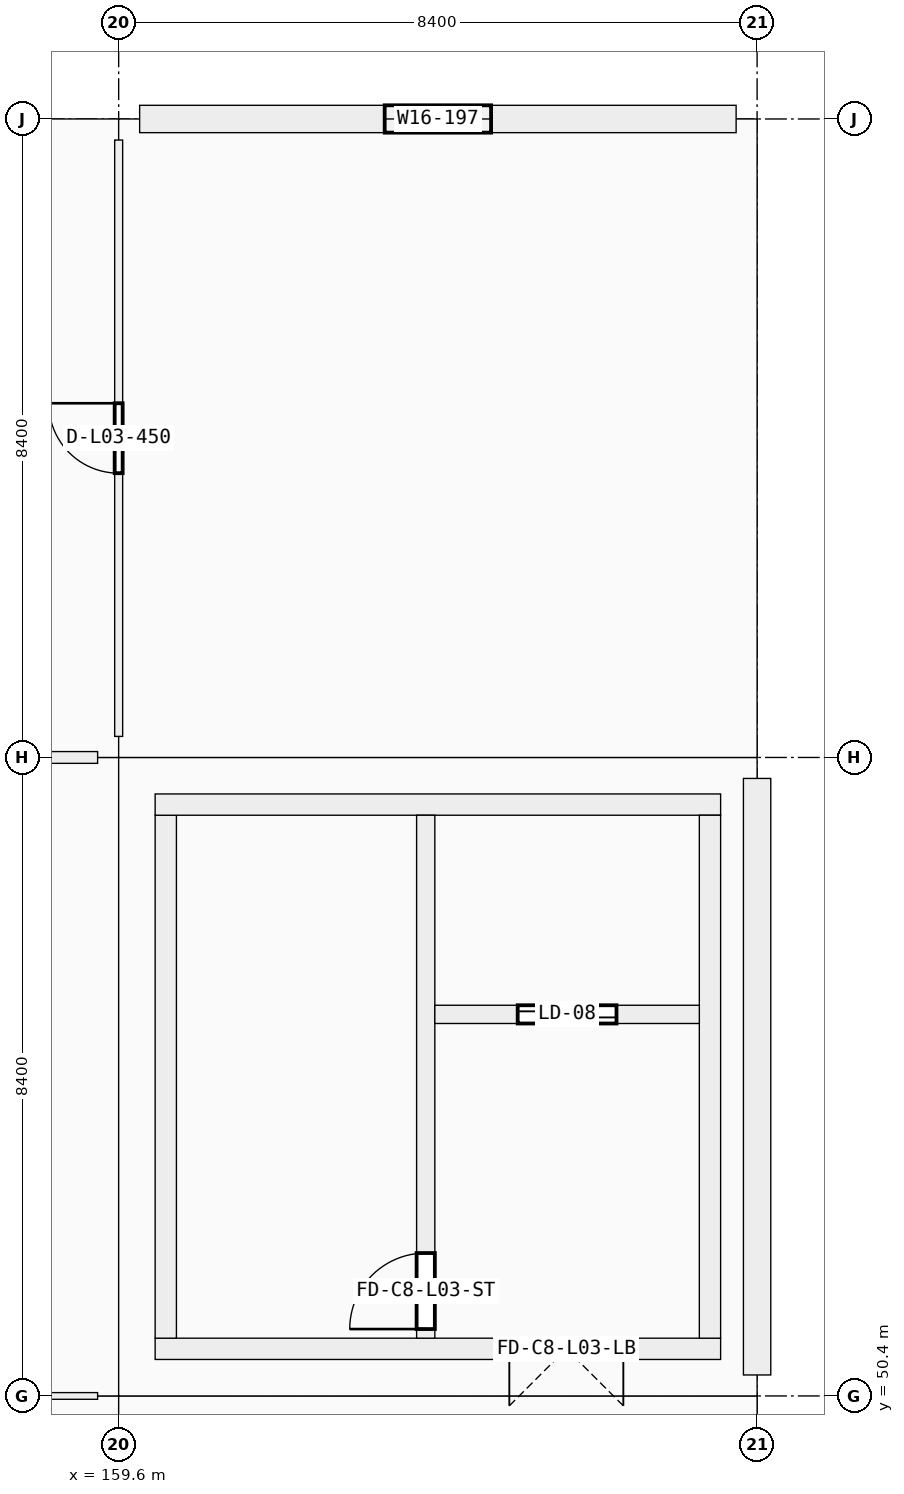
"""IFC4 building model, lengths in metres.
Left out: names, types, materials, properties, quantities, classifications, styles, units other than length and angle.
Written with IfcOpenShell. Run it as: python <this file> out.ifc"""

import sys

from ifc_helpers import new_model, si_unit, direction, frame, frame_2d, origin, origin_2d, place, context, subcontext, project, spatial, rectangle, i_section, extrude, element, fill, save


model = new_model("IFC4")
c1 = context("Model", 3, precision=1e-05, world=origin(), true_north=direction((0.0, 1.0)))
c2 = subcontext(c1, "Body", "Model", "MODEL_VIEW")
j1 = project(units=[si_unit("LENGTHUNIT", "METRE"), si_unit("PLANEANGLEUNIT", "RADIAN")], contexts=[c1])
p1 = place(None, origin())
s1 = spatial("IfcSite", under=j1, at=p1, CompositionType="ELEMENT")
p2 = place(p1, origin())
s2 = spatial("IfcBuilding", under=s1, at=p2, CompositionType="ELEMENT")
p3 = place(p2, frame((0.0, 0.0, 14.76)))
s3 = spatial("IfcBuildingStorey", under=s2, at=p3, CompositionType="ELEMENT", Elevation=14.76)
for number, where, z_axis, x_axis in (
    (1, (159.6, 50.4, 0.0), (0.0, 0.0, 1.0), (1.0, 0.0, 0.0)),
    (2, (159.6, 58.8, 0.0), (0.0, 0.0, 1.0), (1.0, 0.0, 0.0)),
    (3, (159.6, 67.2, 0.0), (0.0, 0.0, 1.0), (1.0, 0.0, 0.0)),
    (4, (168.0, 50.4, 0.0), (0.0, 0.0, 1.0), (1.0, 0.0, 0.0)),
    (5, (168.0, 58.8, 0.0), (0.0, 0.0, 1.0), (1.0, 0.0, 0.0)),
    (6, (168.0, 67.2, 0.0), (0.0, 0.0, 1.0), (1.0, 0.0, 0.0)),
):
    element("IfcColumn", number, at=place(p3, frame(where, z_axis=z_axis, x_axis=x_axis)), inside=s3, PredefinedType="COLUMN", context=c2, shape_type="SweptSolid", body=[
        extrude(rectangle(XDim=0.55, YDim=0.55, at=origin_2d()), origin(), (0.0, 0.0, 1.0), 4.17),
    ])
for number, where, z_axis, x_axis in (
    (7, (159.6, 50.4, 4.17), (0.0, 0.0, 1.0), (1.0, 0.0, 0.0)),
    (8, (167.86, 50.4, 4.17), (0.0, 0.0, 1.0), (1.0, 0.0, 0.0)),
    (9, (159.6, 58.8, 4.17), (0.0, 0.0, 1.0), (1.0, 0.0, 0.0)),
    (10, (167.86, 58.8, 4.17), (0.0, 0.0, 1.0), (1.0, 0.0, 0.0)),
):
    element("IfcColumn", number, at=place(p3, frame(where, z_axis=z_axis, x_axis=x_axis)), inside=s3, PredefinedType="COLUMN", context=c2, shape_type="SweptSolid", body=[
        extrude(i_section(OverallWidth=0.254, OverallDepth=0.254, WebThickness=0.009, FlangeThickness=0.014, FilletRadius=0.013, at=origin_2d()), origin(), (0.0, 0.0, 1.0), 2.157),
    ])
p4 = place(p3, frame((168.0, 58.524, 0.0), z_axis=(0.0, 0.0, 1.0), x_axis=(0.0, -1.0, 0.0)))
e11 = element("IfcWall", 11, at=p4, inside=s3, PredefinedType="SOLIDWALL", context=c2, shape_type="SweptSolid", body=[
    extrude(rectangle(XDim=7.848, YDim=0.36, at=frame_2d((3.924, 0.0))), origin(), (0.0, 0.0, 1.0), 3.37),
])
p5 = place(p3, frame((159.876, 67.2, 0.0), z_axis=(0.0, 0.0, 1.0), x_axis=(1.0, 0.0, 0.0)))
e12 = element("IfcWall", 12, at=p5, inside=s3, PredefinedType="SOLIDWALL", context=c2, shape_type="SweptSolid", body=[
    extrude(rectangle(XDim=7.848, YDim=0.36, at=frame_2d((3.924, 0.0))), origin(), (0.0, 0.0, 1.0), 3.37),
])
p6 = place(p5, frame((3.224, 0.0, 0.9)))
e13 = element("IfcOpeningElement", 13, at=p6, cuts=e12, PredefinedType="OPENING", context=c2, shape_type="SweptSolid", body=[
    extrude(rectangle(XDim=1.4, YDim=1.75, at=frame_2d((0.7, 0.875))), frame((0.0, 0.18, 0.0), z_axis=(0.0, -1.0, 0.0), x_axis=(1.0, 0.0, 0.0)), (0.0, 0.0, 1.0), 0.36),
])
p7 = place(p3, frame((167.52, 51.02, 0.0), z_axis=(0.0, 0.0, 1.0), x_axis=(-1.0, 0.0, 0.0)))
e14 = element("IfcWall", 14, at=p7, inside=s3, PredefinedType="SHEAR", context=c2, shape_type="SweptSolid", body=[
    extrude(rectangle(XDim=7.44, YDim=0.28, at=frame_2d((3.72, 0.0))), origin(), (0.0, 0.0, 1.0), 4.07),
])
p8 = place(p7, frame((1.28, 0.0, 0.0)))
e15 = element("IfcOpeningElement", 15, at=p8, cuts=e14, PredefinedType="OPENING", context=c2, shape_type="SweptSolid", body=[
    extrude(rectangle(XDim=1.5, YDim=2.15, at=frame_2d((0.75, 1.075))), frame((0.0, 0.14, 0.0), z_axis=(0.0, -1.0, 0.0), x_axis=(1.0, 0.0, 0.0)), (0.0, 0.0, 1.0), 0.28),
])
p9 = place(p3, frame((160.22, 51.16, 0.0), z_axis=(0.0, 0.0, 1.0), x_axis=(0.0, 1.0, 0.0)))
e16 = element("IfcWall", 16, at=p9, inside=s3, PredefinedType="SHEAR", context=c2, shape_type="SweptSolid", body=[
    extrude(rectangle(XDim=6.88, YDim=0.28, at=frame_2d((3.44, 0.0))), origin(), (0.0, 0.0, 1.0), 4.07),
])
p10 = place(p3, frame((160.08, 58.18, 0.0), z_axis=(0.0, 0.0, 1.0), x_axis=(1.0, 0.0, 0.0)))
e17 = element("IfcWall", 17, at=p10, inside=s3, PredefinedType="SHEAR", context=c2, shape_type="SweptSolid", body=[
    extrude(rectangle(XDim=7.44, YDim=0.28, at=frame_2d((3.72, 0.0))), origin(), (0.0, 0.0, 1.0), 4.07),
])
p11 = place(p3, frame((167.38, 58.04, 0.0), z_axis=(0.0, 0.0, 1.0), x_axis=(0.0, -1.0, 0.0)))
e18 = element("IfcWall", 18, at=p11, inside=s3, PredefinedType="SHEAR", context=c2, shape_type="SweptSolid", body=[
    extrude(rectangle(XDim=6.88, YDim=0.28, at=frame_2d((3.44, 0.0))), origin(), (0.0, 0.0, 1.0), 4.07),
])
p12 = place(p3, frame((163.64, 51.16, 0.0), z_axis=(0.0, 0.0, 1.0), x_axis=(0.0, 1.0, 0.0)))
e19 = element("IfcWall", 19, at=p12, inside=s3, PredefinedType="SHEAR", context=c2, shape_type="SweptSolid", body=[
    extrude(rectangle(XDim=6.88, YDim=0.24, at=frame_2d((3.44, 0.0))), origin(), (0.0, 0.0, 1.0), 4.07),
])
p13 = place(p12, frame((0.12, 0.0, 0.0)))
e20 = element("IfcOpeningElement", 20, at=p13, cuts=e19, PredefinedType="OPENING", context=c2, shape_type="SweptSolid", body=[
    extrude(rectangle(XDim=1.0, YDim=2.15, at=frame_2d((0.5, 1.075))), frame((0.0, 0.12, 0.0), z_axis=(0.0, -1.0, 0.0), x_axis=(1.0, 0.0, 0.0)), (0.0, 0.0, 1.0), 0.24),
])
p14 = place(p3, frame((163.76, 55.42, 0.0), z_axis=(0.0, 0.0, 1.0), x_axis=(1.0, 0.0, 0.0)))
e21 = element("IfcWall", 21, at=p14, inside=s3, PredefinedType="SHEAR", context=c2, shape_type="SweptSolid", body=[
    extrude(rectangle(XDim=3.48, YDim=0.24, at=frame_2d((1.74, 0.0))), origin(), (0.0, 0.0, 1.0), 4.07),
])
p15 = place(p14, frame((1.09, 0.0, 0.0)))
e22 = element("IfcOpeningElement", 22, at=p15, cuts=e21, PredefinedType="OPENING", context=c2, shape_type="SweptSolid", body=[
    extrude(rectangle(XDim=1.3, YDim=2.25, at=frame_2d((0.65, 1.125))), frame((0.0, 0.12, 0.0), z_axis=(0.0, -1.0, 0.0), x_axis=(1.0, 0.0, 0.0)), (0.0, 0.0, 1.0), 0.24),
])
p16 = place(p3, frame((151.477, 50.4, 0.0), z_axis=(0.0, 0.0, 1.0), x_axis=(1.0, 0.0, 0.0)))
e23 = element("IfcWall", 23, at=p16, inside=s3, PredefinedType="PARTITIONING", context=c2, shape_type="SweptSolid", body=[
    extrude(rectangle(XDim=7.846, YDim=0.088, at=frame_2d((3.923, 0.0))), origin(), (0.0, 0.0, 1.0), 3.19),
])
p17 = place(p16, frame((3.458, 0.0, 0.0)))
e24 = element("IfcOpeningElement", 24, at=p17, cuts=e23, PredefinedType="OPENING", context=c2, shape_type="SweptSolid", body=[
    extrude(rectangle(XDim=0.93, YDim=2.12, at=frame_2d((0.465, 1.06))), frame((0.0, 0.044, 0.0), z_axis=(0.0, -1.0, 0.0), x_axis=(1.0, 0.0, 0.0)), (0.0, 0.0, 1.0), 0.088),
])
p18 = place(p3, frame((151.477, 58.8, 0.0), z_axis=(0.0, 0.0, 1.0), x_axis=(1.0, 0.0, 0.0)))
e25 = element("IfcWall", 25, at=p18, inside=s3, PredefinedType="PARTITIONING", context=c2, shape_type="SweptSolid", body=[
    extrude(rectangle(XDim=7.846, YDim=0.155, at=frame_2d((3.923, 0.0))), origin(), (0.0, 0.0, 1.0), 3.19),
])
p19 = place(p18, frame((3.383, 0.0, 0.0)))
e26 = element("IfcOpeningElement", 26, at=p19, cuts=e25, PredefinedType="OPENING", context=c2, shape_type="SweptSolid", body=[
    extrude(rectangle(XDim=1.08, YDim=2.25, at=frame_2d((0.54, 1.125))), frame((0.0, 0.078, 0.0), z_axis=(0.0, -1.0, 0.0), x_axis=(1.0, 0.0, 0.0)), (0.0, 0.0, 1.0), 0.155),
])
p20 = place(p3, frame((159.6, 59.077, 0.0), z_axis=(0.0, 0.0, 1.0), x_axis=(0.0, 1.0, 0.0)))
e27 = element("IfcWall", 27, at=p20, inside=s3, PredefinedType="PARTITIONING", context=c2, shape_type="SweptSolid", body=[
    extrude(rectangle(XDim=7.846, YDim=0.105, at=frame_2d((3.923, 0.0))), origin(), (0.0, 0.0, 1.0), 3.19),
])
p21 = place(p20, frame((3.463, 0.0, 0.0)))
e28 = element("IfcOpeningElement", 28, at=p21, cuts=e27, PredefinedType="OPENING", context=c2, shape_type="SweptSolid", body=[
    extrude(rectangle(XDim=0.92, YDim=2.15, at=frame_2d((0.46, 1.075))), frame((0.0, 0.052, 0.0), z_axis=(0.0, -1.0, 0.0), x_axis=(1.0, 0.0, 0.0)), (0.0, 0.0, 1.0), 0.105),
])
p22 = place(p6, origin())
e29 = element("IfcWindow", 29, at=p22, inside=s3, PartitioningType="SINGLE_PANEL", PredefinedType="WINDOW", context=c2, shape_type="SweptSolid", body=[
    extrude(rectangle(XDim=1.4, YDim=1.75, at=frame_2d((0.7, 0.875))), frame((0.0, 0.03, 0.0), z_axis=(0.0, -1.0, 0.0), x_axis=(1.0, 0.0, 0.0)), (0.0, 0.0, 1.0), 0.06),
])
fill(e13, e29)
p23 = place(p13, origin())
e30 = element("IfcDoor", 30, at=p23, inside=s3, OperationType="SINGLE_SWING_LEFT", PredefinedType="DOOR", context=c2, shape_type="SweptSolid", body=[
    extrude(rectangle(XDim=1.0, YDim=2.15, at=frame_2d((0.5, 1.075))), frame((0.0, 0.025, 0.0), z_axis=(0.0, -1.0, 0.0), x_axis=(1.0, 0.0, 0.0)), (0.0, 0.0, 1.0), 0.05),
])
fill(e20, e30)
p24 = place(p8, origin())
e31 = element("IfcDoor", 31, at=p24, inside=s3, OperationType="DOUBLE_DOOR_SINGLE_SWING", PredefinedType="DOOR", context=c2, shape_type="SweptSolid", body=[
    extrude(rectangle(XDim=1.5, YDim=2.15, at=frame_2d((0.75, 1.075))), frame((0.0, 0.025, 0.0), z_axis=(0.0, -1.0, 0.0), x_axis=(1.0, 0.0, 0.0)), (0.0, 0.0, 1.0), 0.05),
])
fill(e15, e31)
p25 = place(p15, origin())
e32 = element("IfcDoor", 32, at=p25, inside=s3, OperationType="DOUBLE_DOOR_SLIDING", PredefinedType="DOOR", context=c2, shape_type="SweptSolid", body=[
    extrude(rectangle(XDim=1.3, YDim=2.25, at=frame_2d((0.65, 1.125))), frame((0.0, 0.025, 0.0), z_axis=(0.0, -1.0, 0.0), x_axis=(1.0, 0.0, 0.0)), (0.0, 0.0, 1.0), 0.05),
])
fill(e22, e32)
p26 = place(p21, origin())
e33 = element("IfcDoor", 33, at=p26, inside=s3, OperationType="SINGLE_SWING_RIGHT", PredefinedType="DOOR", context=c2, shape_type="SweptSolid", body=[
    extrude(rectangle(XDim=0.92, YDim=2.15, at=frame_2d((0.46, 1.075))), frame((0.0, 0.025, 0.0), z_axis=(0.0, -1.0, 0.0), x_axis=(1.0, 0.0, 0.0)), (0.0, 0.0, 1.0), 0.05),
])
fill(e28, e33)
save(model, sys.argv[1])
